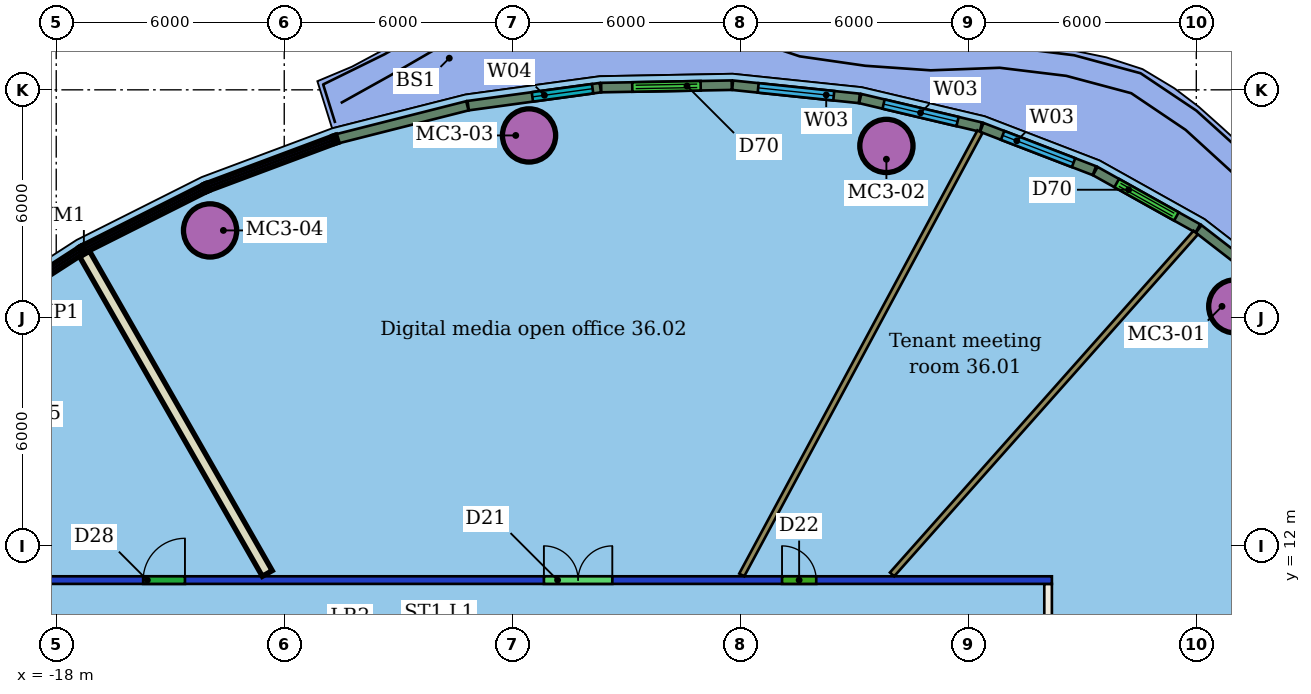
"""IFC4 building model, lengths in metres.
Left out: names, types, materials, properties, quantities, classifications, styles, units other than length and angle.
Written with IfcOpenShell. Run it as: python <this file> out.ifc"""

import sys

from ifc_helpers import new_model, si_unit, direction, frame, frame_2d, origin, origin_2d, place, context, subcontext, project, spatial, rectangle, hollow_circle, extrude, element, fill, save


model = new_model("IFC4")
c1 = context("Model", 3, precision=1e-05, world=origin(), true_north=direction((0.0, 1.0)))
c2 = subcontext(c1, "Body", "Model", "MODEL_VIEW")
j1 = project(units=[si_unit("LENGTHUNIT", "METRE"), si_unit("PLANEANGLEUNIT", "RADIAN")], contexts=[c1])
p1 = place(None, origin())
s1 = spatial("IfcSite", under=j1, at=p1, CompositionType="ELEMENT")
p2 = place(p1, origin())
s2 = spatial("IfcBuilding", under=s1, at=p2, CompositionType="ELEMENT")
p3 = place(p2, frame((0.0, 0.0, 154.2)))
s3 = spatial("IfcBuildingStorey", under=s2, at=p3, CompositionType="ELEMENT", Elevation=154.2)
for number, where, z_axis, x_axis in (
    (1, (13.026, 18.303, 0.0), (0.0, 0.0, 1.0), (1.0, 0.0, 0.0)),
    (2, (3.845, 22.524, 0.0), (0.0, 0.0, 1.0), (1.0, 0.0, 0.0)),
    (3, (-5.558, 22.8, 0.0), (0.0, 0.0, 1.0), (1.0, 0.0, 0.0)),
    (4, (-13.952, 20.301, 0.0), (0.0, 0.0, 1.0), (1.0, 0.0, 0.0)),
):
    element("IfcColumn", number, at=place(p3, frame(where, z_axis=z_axis, x_axis=x_axis)), inside=s3, PredefinedType="COLUMN", context=c2, shape_type="SweptSolid", body=[
        extrude(hollow_circle(Radius=0.7, WallThickness=0.05, at=origin_2d()), origin(), (0.0, 0.0, 1.0), 3.45),
    ])
p4 = place(p3, frame((-20.2, 11.1, 0.0), z_axis=(0.0, 0.0, 1.0), x_axis=(1.0, 0.0, 0.0)))
e5 = element("IfcWall", 5, at=p4, inside=s3, PredefinedType="PARTITIONING", context=c2, shape_type="SweptSolid", body=[
    extrude(rectangle(XDim=28.4, YDim=0.2, at=frame_2d((14.2, 0.0))), origin(), (0.0, 0.0, 1.0), 3.05),
])
p5 = place(p4, frame((21.299, 0.0, 0.0)))
e6 = element("IfcOpeningElement", 6, at=p5, cuts=e5, PredefinedType="OPENING", context=c2, shape_type="SweptSolid", body=[
    extrude(rectangle(XDim=0.9, YDim=2.1, at=frame_2d((0.45, 1.05))), frame((0.0, 0.11, 0.0), z_axis=(0.0, -1.0, 0.0), x_axis=(1.0, 0.0, 0.0)), (0.0, 0.0, 1.0), 0.22),
])
p6 = place(p4, frame((15.033, 0.0, 0.0)))
e7 = element("IfcOpeningElement", 7, at=p6, cuts=e5, PredefinedType="OPENING", context=c2, shape_type="SweptSolid", body=[
    extrude(rectangle(XDim=1.8, YDim=2.1, at=frame_2d((0.9, 1.05))), frame((0.0, 0.11, 0.0), z_axis=(0.0, -1.0, 0.0), x_axis=(1.0, 0.0, 0.0)), (0.0, 0.0, 1.0), 0.22),
])
p7 = place(p4, frame((4.487, 0.0, 0.0)))
e8 = element("IfcOpeningElement", 8, at=p7, cuts=e5, PredefinedType="OPENING", context=c2, shape_type="SweptSolid", body=[
    extrude(rectangle(XDim=1.1, YDim=2.1, at=frame_2d((0.55, 1.05))), frame((0.0, 0.11, 0.0), z_axis=(0.0, -1.0, 0.0), x_axis=(1.0, 0.0, 0.0)), (0.0, 0.0, 1.0), 0.22),
])
p8 = place(p3, frame((8.1, 11.0, 0.0), z_axis=(0.0, 0.0, 1.0), x_axis=(0.0, -1.0, 0.0)))
e9 = element("IfcWall", 9, at=p8, inside=s3, PredefinedType="PARTITIONING", context=c2, shape_type="SweptSolid", body=[
    extrude(rectangle(XDim=22.0, YDim=0.2, at=frame_2d((11.0, 0.0))), origin(), (0.0, 0.0, 1.0), 3.45),
])
p9 = place(p8, frame((13.221, 0.0, 0.0)))
e10 = element("IfcOpeningElement", 10, at=p9, cuts=e9, PredefinedType="OPENING", context=c2, shape_type="SweptSolid", body=[
    extrude(rectangle(XDim=1.8, YDim=2.1, at=frame_2d((0.9, 1.05))), frame((0.0, 0.11, 0.0), z_axis=(0.0, -1.0, 0.0), x_axis=(1.0, 0.0, 0.0)), (0.0, 0.0, 1.0), 0.22),
])
p10 = place(p8, frame((5.411, 0.0, 0.0)))
e11 = element("IfcOpeningElement", 11, at=p10, cuts=e9, PredefinedType="OPENING", context=c2, shape_type="SweptSolid", body=[
    extrude(rectangle(XDim=1.8, YDim=2.1, at=frame_2d((0.9, 1.05))), frame((0.0, 0.11, 0.0), z_axis=(0.0, -1.0, 0.0), x_axis=(1.0, 0.0, 0.0)), (0.0, 0.0, 1.0), 0.22),
])
p11 = place(p3, frame((11.983, 20.243, 0.0), z_axis=(0.0, 0.0, 1.0), x_axis=(-0.664145873582, -0.747603008691, 0.0)))
e12 = element("IfcWall", 12, at=p11, inside=s3, PredefinedType="PARTITIONING", context=c2, shape_type="SweptSolid", body=[
    extrude(rectangle(XDim=12.029, YDim=0.15, at=frame_2d((6.015, 0.0))), origin(), (0.0, 0.0, 1.0), 3.45),
])
p12 = place(p3, frame((6.307, 22.898, 0.0), z_axis=(0.0, 0.0, 1.0), x_axis=(-0.473431131889, -0.88083083697, 0.0)))
e13 = element("IfcWall", 13, at=p12, inside=s3, PredefinedType="PARTITIONING", context=c2, shape_type="SweptSolid", body=[
    extrude(rectangle(XDim=13.24, YDim=0.15, at=frame_2d((6.62, 0.0))), origin(), (0.0, 0.0, 1.0), 3.45),
])
p13 = place(p3, frame((-17.253, 19.68, 0.0), z_axis=(0.0, 0.0, 1.0), x_axis=(0.496369717396, -0.868111227696, 0.0)))
e14 = element("IfcWall", 14, at=p13, inside=s3, PredefinedType="PARTITIONING", context=c2, shape_type="SweptSolid", body=[
    extrude(rectangle(XDim=9.683, YDim=0.3, at=frame_2d((4.842, 0.0))), origin(), (0.0, 0.0, 1.0), 3.45),
])
p14 = place(p3, frame((14.421, 18.513, 0.0), z_axis=(0.0, 0.0, 1.0), x_axis=(-0.790822117726, 0.612046058818, 0.0)))
e15 = element("IfcWall", 15, at=p14, inside=s3, PredefinedType="SOLIDWALL", context=c2, shape_type="SweptSolid", body=[
    extrude(rectangle(XDim=2.982, YDim=0.25, at=frame_2d((1.491, 0.0))), origin(), (0.0, 0.0, 1.0), 3.1),
])
p15 = place(p3, frame((12.041, 20.354, 0.0), z_axis=(0.0, 0.0, 1.0), x_axis=(-0.872921725824, 0.487860287976, 0.0)))
e16 = element("IfcWall", 16, at=p15, inside=s3, PredefinedType="SOLIDWALL", context=c2, shape_type="SweptSolid", body=[
    extrude(rectangle(XDim=3.092, YDim=0.25, at=frame_2d((1.546, 0.0))), origin(), (0.0, 0.0, 1.0), 3.1),
])
p16 = place(p15, frame((0.646, 0.0, 0.0)))
e17 = element("IfcOpeningElement", 17, at=p16, cuts=e16, PredefinedType="OPENING", context=c2, shape_type="SweptSolid", body=[
    extrude(rectangle(XDim=1.8, YDim=2.4, at=frame_2d((0.9, 1.2))), frame((0.0, 0.135, 0.0), z_axis=(0.0, -1.0, 0.0), x_axis=(1.0, 0.0, 0.0)), (0.0, 0.0, 1.0), 0.27),
])
p17 = place(p3, frame((9.318, 21.873, 0.0), z_axis=(0.0, 0.0, 1.0), x_axis=(-0.933292072191, 0.359118236777, 0.0)))
e18 = element("IfcWall", 18, at=p17, inside=s3, PredefinedType="SOLIDWALL", context=c2, shape_type="SweptSolid", body=[
    extrude(rectangle(XDim=3.174, YDim=0.25, at=frame_2d((1.587, 0.0))), origin(), (0.0, 0.0, 1.0), 3.1),
])
p18 = place(p17, frame((0.587, 0.0, 0.9)))
e19 = element("IfcOpeningElement", 19, at=p18, cuts=e18, PredefinedType="OPENING", context=c2, shape_type="SweptSolid", body=[
    extrude(rectangle(XDim=2.0, YDim=2.1, at=frame_2d((1.0, 1.05))), frame((0.0, 0.135, 0.0), z_axis=(0.0, -1.0, 0.0), x_axis=(1.0, 0.0, 0.0)), (0.0, 0.0, 1.0), 0.27),
])
p19 = place(p3, frame((6.332, 23.02, 0.0), z_axis=(0.0, 0.0, 1.0), x_axis=(-0.973203796477, 0.229944276993, 0.0)))
e20 = element("IfcWall", 20, at=p19, inside=s3, PredefinedType="SOLIDWALL", context=c2, shape_type="SweptSolid", body=[
    extrude(rectangle(XDim=3.263, YDim=0.25, at=frame_2d((1.631, 0.0))), origin(), (0.0, 0.0, 1.0), 3.1),
])
p20 = place(p19, frame((0.631, 0.0, 0.9)))
e21 = element("IfcOpeningElement", 21, at=p20, cuts=e20, PredefinedType="OPENING", context=c2, shape_type="SweptSolid", body=[
    extrude(rectangle(XDim=2.0, YDim=2.1, at=frame_2d((1.0, 1.05))), frame((0.0, 0.135, 0.0), z_axis=(0.0, -1.0, 0.0), x_axis=(1.0, 0.0, 0.0)), (0.0, 0.0, 1.0), 0.27),
])
p21 = place(p3, frame((3.133, 23.775, 0.0), z_axis=(0.0, 0.0, 1.0), x_axis=(-0.994629661269, 0.103498004442, 0.0)))
e22 = element("IfcWall", 22, at=p21, inside=s3, PredefinedType="SOLIDWALL", context=c2, shape_type="SweptSolid", body=[
    extrude(rectangle(XDim=3.352, YDim=0.25, at=frame_2d((1.676, 0.0))), origin(), (0.0, 0.0, 1.0), 3.1),
])
p22 = place(p21, frame((0.676, 0.0, 0.9)))
e23 = element("IfcOpeningElement", 23, at=p22, cuts=e22, PredefinedType="OPENING", context=c2, shape_type="SweptSolid", body=[
    extrude(rectangle(XDim=2.0, YDim=2.1, at=frame_2d((1.0, 1.05))), frame((0.0, 0.135, 0.0), z_axis=(0.0, -1.0, 0.0), x_axis=(1.0, 0.0, 0.0)), (0.0, 0.0, 1.0), 0.27),
])
p23 = place(p3, frame((-0.225, 24.123, 0.0), z_axis=(0.0, 0.0, 1.0), x_axis=(-0.999829330631, -0.018474566553, 0.0)))
e24 = element("IfcWall", 24, at=p23, inside=s3, PredefinedType="SOLIDWALL", context=c2, shape_type="SweptSolid", body=[
    extrude(rectangle(XDim=3.436, YDim=0.25, at=frame_2d((1.718, 0.0))), origin(), (0.0, 0.0, 1.0), 3.1),
])
p24 = place(p23, frame((0.818, 0.0, 0.0)))
e25 = element("IfcOpeningElement", 25, at=p24, cuts=e24, PredefinedType="OPENING", context=c2, shape_type="SweptSolid", body=[
    extrude(rectangle(XDim=1.8, YDim=2.4, at=frame_2d((0.9, 1.2))), frame((0.0, 0.135, 0.0), z_axis=(0.0, -1.0, 0.0), x_axis=(1.0, 0.0, 0.0)), (0.0, 0.0, 1.0), 0.27),
])
p25 = place(p3, frame((-3.682, 24.057, 0.0), z_axis=(0.0, 0.0, 1.0), x_axis=(-0.990850899639, -0.134961085818, 0.0)))
e26 = element("IfcWall", 26, at=p25, inside=s3, PredefinedType="SOLIDWALL", context=c2, shape_type="SweptSolid", body=[
    extrude(rectangle(XDim=3.51, YDim=0.25, at=frame_2d((1.755, 0.0))), origin(), (0.0, 0.0, 1.0), 3.1),
])
p26 = place(p25, frame((0.205, 0.0, 0.9)))
e27 = element("IfcOpeningElement", 27, at=p26, cuts=e26, PredefinedType="OPENING", context=c2, shape_type="SweptSolid", body=[
    extrude(rectangle(XDim=1.6, YDim=2.1, at=frame_2d((0.8, 1.05))), frame((0.0, 0.135, 0.0), z_axis=(0.0, -1.0, 0.0), x_axis=(1.0, 0.0, 0.0)), (0.0, 0.0, 1.0), 0.27),
])
p27 = place(p3, frame((-7.181, 23.58, 0.0), z_axis=(0.0, 0.0, 1.0), x_axis=(-0.969375678266, -0.245582561242, 0.0)))
e28 = element("IfcWall", 28, at=p27, inside=s3, PredefinedType="SOLIDWALL", context=c2, shape_type="SweptSolid", body=[
    extrude(rectangle(XDim=3.524, YDim=0.25, at=frame_2d((1.762, 0.0))), origin(), (0.0, 0.0, 1.0), 3.1),
])
p28 = place(p5, origin())
e29 = element("IfcDoor", 29, at=p28, inside=s3, OperationType="SINGLE_SWING_LEFT", PredefinedType="DOOR", context=c2, shape_type="SweptSolid", body=[
    extrude(rectangle(XDim=0.9, YDim=2.1, at=frame_2d((0.45, 1.05))), frame((0.0, 0.025, 0.0), z_axis=(0.0, -1.0, 0.0), x_axis=(1.0, 0.0, 0.0)), (0.0, 0.0, 1.0), 0.05),
])
fill(e6, e29)
p29 = place(p6, origin())
e30 = element("IfcDoor", 30, at=p29, inside=s3, OperationType="DOUBLE_DOOR_SINGLE_SWING", PredefinedType="DOOR", context=c2, shape_type="SweptSolid", body=[
    extrude(rectangle(XDim=1.8, YDim=2.1, at=frame_2d((0.9, 1.05))), frame((0.0, 0.025, 0.0), z_axis=(0.0, -1.0, 0.0), x_axis=(1.0, 0.0, 0.0)), (0.0, 0.0, 1.0), 0.05),
])
fill(e7, e30)
p30 = place(p7, origin())
e31 = element("IfcDoor", 31, at=p30, inside=s3, OperationType="SINGLE_SWING_RIGHT", PredefinedType="DOOR", context=c2, shape_type="SweptSolid", body=[
    extrude(rectangle(XDim=1.1, YDim=2.1, at=frame_2d((0.55, 1.05))), frame((0.0, 0.025, 0.0), z_axis=(0.0, -1.0, 0.0), x_axis=(1.0, 0.0, 0.0)), (0.0, 0.0, 1.0), 0.05),
])
fill(e8, e31)
p31 = place(p16, origin())
e32 = element("IfcDoor", 32, at=p31, inside=s3, OperationType="DOUBLE_DOOR_SLIDING", PredefinedType="DOOR", context=c2, shape_type="SweptSolid", body=[
    extrude(rectangle(XDim=1.8, YDim=2.4, at=frame_2d((0.9, 1.2))), frame((0.0, 0.025, 0.0), z_axis=(0.0, -1.0, 0.0), x_axis=(1.0, 0.0, 0.0)), (0.0, 0.0, 1.0), 0.05),
])
fill(e17, e32)
p32 = place(p18, origin())
e33 = element("IfcWindow", 33, at=p32, inside=s3, PartitioningType="SINGLE_PANEL", PredefinedType="WINDOW", context=c2, shape_type="SweptSolid", body=[
    extrude(rectangle(XDim=2.0, YDim=2.1, at=frame_2d((1.0, 1.05))), frame((0.0, 0.03, 0.0), z_axis=(0.0, -1.0, 0.0), x_axis=(1.0, 0.0, 0.0)), (0.0, 0.0, 1.0), 0.06),
])
fill(e19, e33)
p33 = place(p20, origin())
e34 = element("IfcWindow", 34, at=p33, inside=s3, PartitioningType="SINGLE_PANEL", PredefinedType="WINDOW", context=c2, shape_type="SweptSolid", body=[
    extrude(rectangle(XDim=2.0, YDim=2.1, at=frame_2d((1.0, 1.05))), frame((0.0, 0.03, 0.0), z_axis=(0.0, -1.0, 0.0), x_axis=(1.0, 0.0, 0.0)), (0.0, 0.0, 1.0), 0.06),
])
fill(e21, e34)
p34 = place(p22, origin())
e35 = element("IfcWindow", 35, at=p34, inside=s3, PartitioningType="SINGLE_PANEL", PredefinedType="WINDOW", context=c2, shape_type="SweptSolid", body=[
    extrude(rectangle(XDim=2.0, YDim=2.1, at=frame_2d((1.0, 1.05))), frame((0.0, 0.03, 0.0), z_axis=(0.0, -1.0, 0.0), x_axis=(1.0, 0.0, 0.0)), (0.0, 0.0, 1.0), 0.06),
])
fill(e23, e35)
p35 = place(p24, origin())
e36 = element("IfcDoor", 36, at=p35, inside=s3, OperationType="DOUBLE_DOOR_SLIDING", PredefinedType="DOOR", context=c2, shape_type="SweptSolid", body=[
    extrude(rectangle(XDim=1.8, YDim=2.4, at=frame_2d((0.9, 1.2))), frame((0.0, 0.025, 0.0), z_axis=(0.0, -1.0, 0.0), x_axis=(1.0, 0.0, 0.0)), (0.0, 0.0, 1.0), 0.05),
])
fill(e25, e36)
p36 = place(p26, origin())
e37 = element("IfcWindow", 37, at=p36, inside=s3, PartitioningType="SINGLE_PANEL", PredefinedType="WINDOW", context=c2, shape_type="SweptSolid", body=[
    extrude(rectangle(XDim=1.6, YDim=2.1, at=frame_2d((0.8, 1.05))), frame((0.0, 0.03, 0.0), z_axis=(0.0, -1.0, 0.0), x_axis=(1.0, 0.0, 0.0)), (0.0, 0.0, 1.0), 0.06),
])
fill(e27, e37)
save(model, sys.argv[1])
